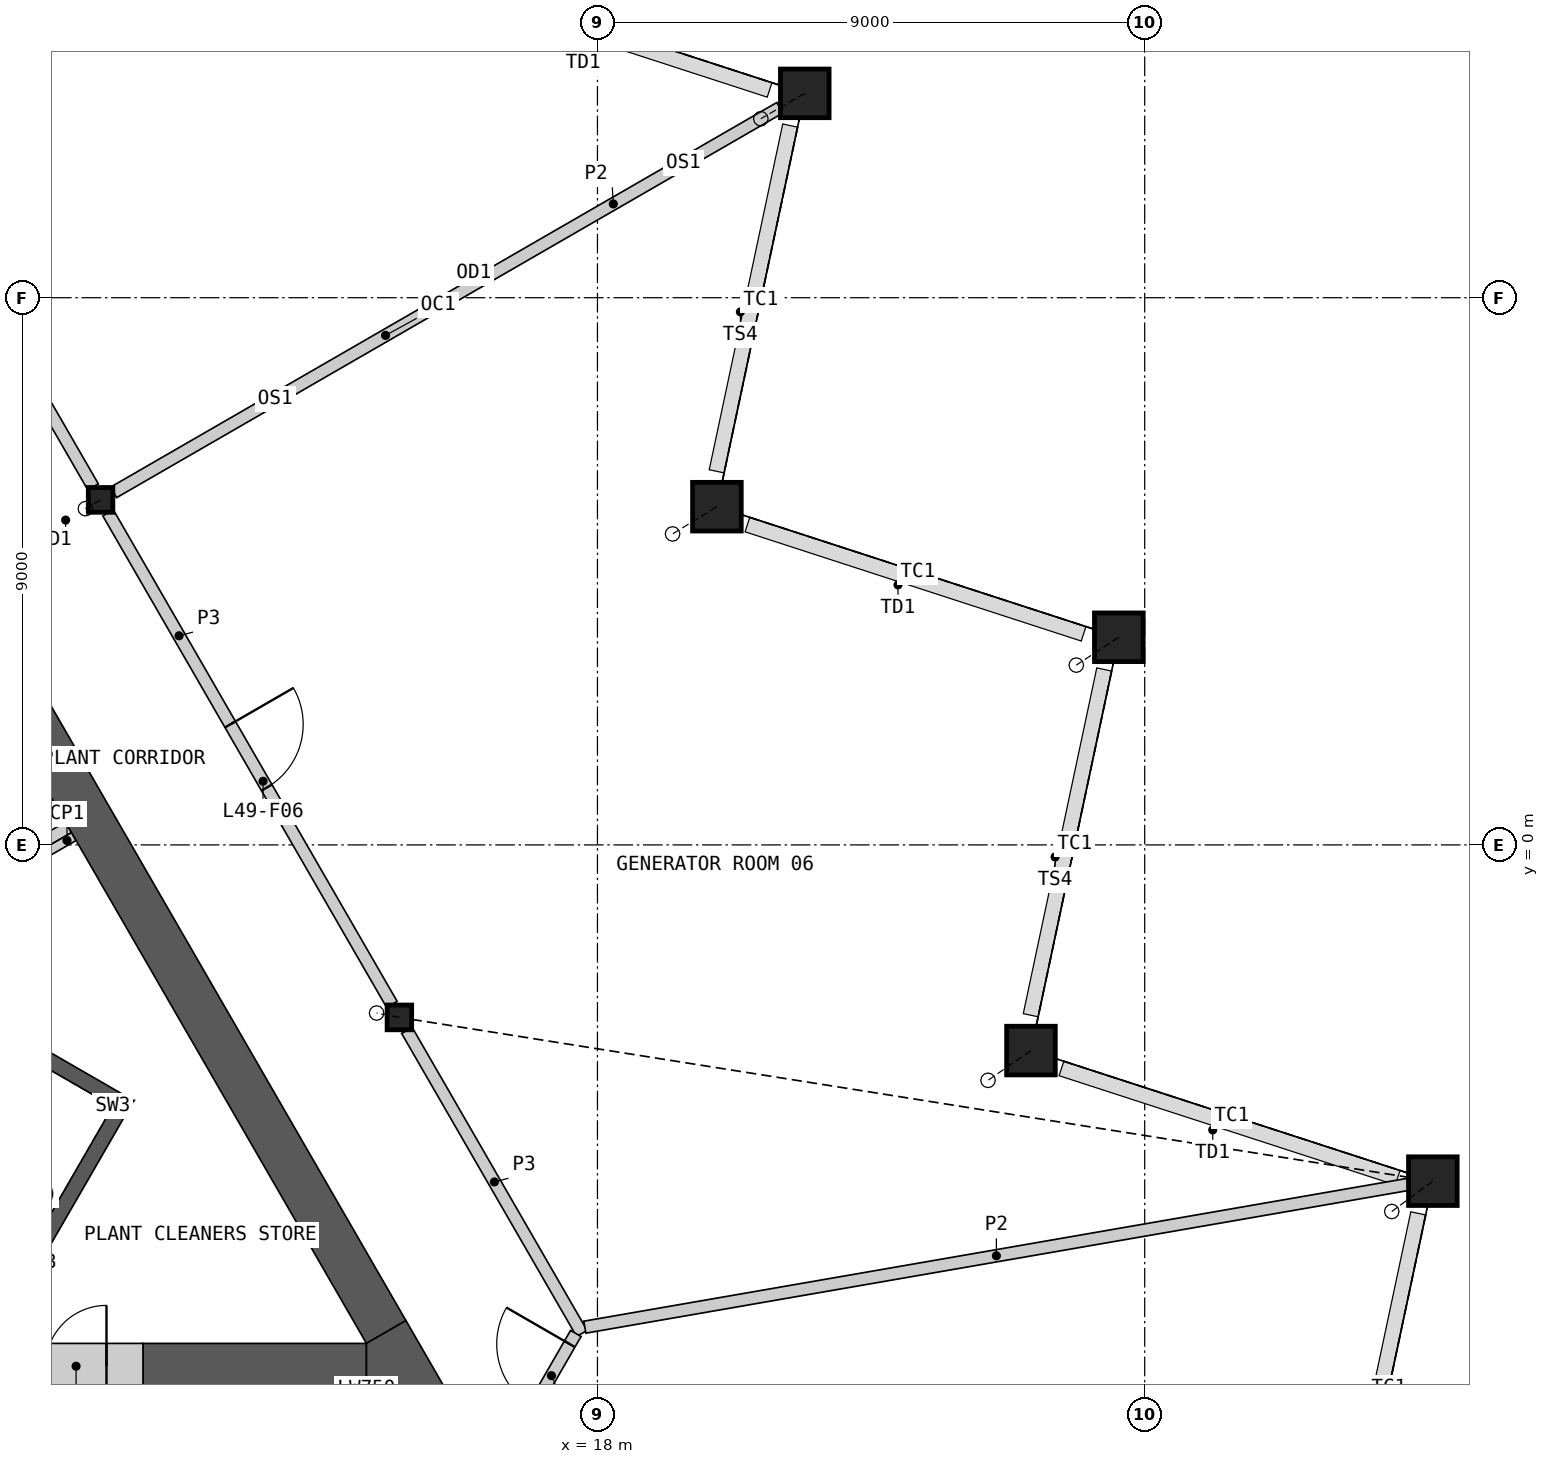
"""IFC4 building model, lengths in metres.
Left out: names, types, materials, properties, quantities, classifications, styles, units other than length and angle.
Written with IfcOpenShell. Run it as: python <this file> out.ifc"""

import sys

from ifc_helpers import new_model, si_unit, direction, frame, frame_2d, origin, origin_2d, place, context, subcontext, project, spatial, polyline, rectangle, hollow_rectangle, i_section, outline, extrude, element, fill, save


model = new_model("IFC4")
c1 = context("Model", 3, precision=1e-05, world=origin(), true_north=direction((0.0, 1.0)))
c2 = subcontext(c1, "Body", "Model", "MODEL_VIEW")
j1 = project(units=[si_unit("LENGTHUNIT", "METRE"), si_unit("PLANEANGLEUNIT", "RADIAN")], contexts=[c1])
p1 = place(None, origin())
s1 = spatial("IfcSite", under=j1, at=p1, CompositionType="ELEMENT")
p2 = place(p1, origin())
s2 = spatial("IfcBuilding", under=s1, at=p2, CompositionType="ELEMENT")
p3 = place(p2, frame((0.0, 0.0, 226.0)))
s3 = spatial("IfcBuildingStorey", under=s2, at=p3, CompositionType="ELEMENT", Elevation=226.0)
p4 = place(p3, frame((31.739, -5.53, 0.0), z_axis=(-0.133288732676, -0.098377485859, 0.986182530781), x_axis=(0.593843336629, -0.804580692995, 0.0)))
e1 = element("IfcColumn", 1, at=p4, inside=s3, PredefinedType="COLUMN", context=c2, shape_type="SweptSolid", body=[
    extrude(hollow_rectangle(XDim=0.8, YDim=0.8, WallThickness=0.05, at=origin_2d()), frame((0.0, 0.0, 0.067)), (0.0, 0.0, 1.0), 4.936),
])
p5 = place(p3, frame((25.129, -3.383, 0.0), z_axis=(-0.139172656038, -0.096391020071, 0.985565696979), x_axis=(0.569372564358, -0.822079608649, 0.0)))
e2 = element("IfcColumn", 2, at=p5, inside=s3, PredefinedType="COLUMN", context=c2, shape_type="SweptSolid", body=[
    extrude(hollow_rectangle(XDim=0.8, YDim=0.8, WallThickness=0.05, at=origin_2d()), frame((0.0, 0.0, 0.069)), (0.0, 0.0, 1.0), 4.936),
])
p6 = place(p3, frame((26.574, 3.415, 0.0), z_axis=(-0.137929662691, -0.090347781846, 0.986312671755), x_axis=(0.547941692307, -0.836516528128, 0.0)))
e3 = element("IfcColumn", 3, at=p6, inside=s3, PredefinedType="COLUMN", context=c2, shape_type="SweptSolid", body=[
    extrude(hollow_rectangle(XDim=0.8, YDim=0.8, WallThickness=0.05, at=origin_2d()), frame((0.0, 0.0, 0.067)), (0.0, 0.0, 1.0), 4.936),
])
p7 = place(p3, frame((19.965, 5.563, 0.0), z_axis=(-0.143805256431, -0.088362266, 0.985653163222), x_axis=(0.52352457136, -0.852010576919, 0.0)))
e4 = element("IfcColumn", 4, at=p7, inside=s3, PredefinedType="COLUMN", context=c2, shape_type="SweptSolid", body=[
    extrude(hollow_rectangle(XDim=0.8, YDim=0.8, WallThickness=0.05, at=origin_2d()), frame((0.0, 0.0, 0.069)), (0.0, 0.0, 1.0), 4.936),
])
p8 = place(p3, frame((21.409, 12.361, 0.0), z_axis=(-0.142558983537, -0.082356710084, 0.986354048259), x_axis=(0.500228859883, -0.865893231143, 0.0)))
e5 = element("IfcColumn", 5, at=p8, inside=s3, PredefinedType="COLUMN", context=c2, shape_type="SweptSolid", body=[
    extrude(hollow_rectangle(XDim=0.8, YDim=0.8, WallThickness=0.05, at=origin_2d()), frame((0.0, 0.0, 0.067)), (0.0, 0.0, 1.0), 4.936),
])
p9 = place(p3, frame((14.743, -2.837, 0.0), z_axis=(-0.074782233985, 0.014362473324, 0.997096453128), x_axis=(-0.188610251533, -0.982052021543, 0.0)))
e6 = element("IfcColumn", 6, at=p9, inside=s3, PredefinedType="COLUMN", context=c2, shape_type="SweptSolid", body=[
    extrude(i_section(OverallWidth=0.404, OverallDepth=0.407, WebThickness=0.027, FlangeThickness=0.044, at=origin_2d()), frame((0.0, 0.0, 0.016)), (0.0, 0.0, 1.0), 4.983),
])
p10 = place(p3, frame((9.828, 5.675, 0.0), z_axis=(-0.049916818753, -0.028858160841, 0.998336375055), x_axis=(0.500502949238, -0.865734831114, 0.0)))
e7 = element("IfcColumn", 7, at=p10, inside=s3, PredefinedType="COLUMN", context=c2, shape_type="SweptSolid", body=[
    extrude(i_section(OverallWidth=0.404, OverallDepth=0.407, WebThickness=0.027, FlangeThickness=0.044, at=origin_2d()), frame((0.0, 0.0, 0.012)), (0.0, 0.0, 1.0), 4.985),
])
p11 = place(p3, frame((8.181, -0.357, 0.0), z_axis=(0.0, 0.0, 1.0), x_axis=(0.866003189247, 0.500038474733, 0.0)))
e8 = element("IfcWall", 8, at=p11, inside=s3, PredefinedType="SHEAR", context=c2, shape_type="SweptSolid", body=[
    extrude(rectangle(XDim=1.293, YDim=0.2, at=frame_2d((0.646, 0.0))), origin(), (0.0, 0.0, 1.0), 4.65),
])
p12 = place(p3, origin())
e9 = element("IfcWall", 9, at=p12, inside=s3, PredefinedType="SHEAR", context=c2, shape_type="SweptSolid", body=[
    extrude(outline(polyline([(8.83, -6.881), (10.374, -4.206), (10.032, -4.298), (8.738, -6.539), (8.83, -6.881)])), origin(), (0.0, 0.0, 1.0), 4.65),
])
p13 = place(p3, origin())
e10 = element("IfcWall", 10, at=p13, inside=s3, PredefinedType="SHEAR", context=c2, shape_type="SweptSolid", body=[
    extrude(outline(polyline([(10.032, -4.298), (10.374, -4.206), (5.307, -1.281), (5.182, -1.498), (10.032, -4.298)])), origin(), (0.0, 0.0, 1.0), 4.65),
])
p14 = place(p3, frame((8.268, -0.509, 0.0), z_axis=(0.0, 0.0, 1.0), x_axis=(0.866003189247, 0.500038474733, 0.0)))
e11 = element("IfcWall", 11, at=p14, inside=s3, PredefinedType="PARTITIONING", context=c2, shape_type="SweptSolid", body=[
    extrude(rectangle(XDim=1.293, YDim=0.15, at=frame_2d((0.646, 0.0))), origin(), (0.0, 0.0, 1.0), 4.65),
])
p15 = place(p3, frame((10.525, -8.574, 0.0), z_axis=(0.0, 0.0, 1.0), x_axis=(1.0, 0.0, 0.0)))
e12 = element("IfcWall", 12, at=p15, inside=s3, PredefinedType="SHEAR", context=c2, shape_type="SweptSolid", body=[
    extrude(rectangle(XDim=3.676, YDim=0.75, at=frame_2d((1.838, 0.0))), origin(), (0.0, 0.0, 1.0), 4.65),
])
p16 = place(p3, frame((14.526, -8.011, 0.0), z_axis=(0.0, 0.0, 1.0), x_axis=(-0.499994855372, 0.866028374016, 0.0)))
e13 = element("IfcWall", 13, at=p16, inside=s3, PredefinedType="SHEAR", context=c2, shape_type="SweptSolid", body=[
    extrude(rectangle(XDim=14.301, YDim=0.75, at=frame_2d((7.15, 0.0))), origin(), (0.0, 0.0, 1.0), 4.65),
])
p17 = place(p3, origin())
e14 = element("IfcWall", 14, at=p17, inside=s3, PredefinedType="SHEAR", context=c2, shape_type="SweptSolid", body=[
    extrude(outline(polyline([(14.201, -8.949), (14.201, -8.199), (14.851, -7.824), (15.5, -8.949), (14.201, -8.949)])), origin(), (0.0, 0.0, 1.0), 4.65),
])
p18 = place(p3, frame((8.325, -8.574, 0.0), z_axis=(0.0, 0.0, 1.0), x_axis=(1.0, 0.0, 0.0)))
e15 = element("IfcWall", 15, at=p18, inside=s3, PredefinedType="SHEAR", context=c2, shape_type="SweptSolid", body=[
    extrude(rectangle(XDim=2.2, YDim=0.75, at=frame_2d((1.1, 0.0))), origin(), (0.0, 0.0, 1.0), 4.65),
])
p19 = place(p18, frame((0.6, 0.0, 0.0)))
e16 = element("IfcOpeningElement", 16, at=p19, cuts=e15, PredefinedType="OPENING", context=c2, shape_type="SweptSolid", body=[
    extrude(rectangle(XDim=1.0, YDim=2.1, at=frame_2d((0.5, 1.05))), frame((0.0, 0.385, 0.0), z_axis=(0.0, -1.0, 0.0), x_axis=(1.0, 0.0, 0.0)), (0.0, 0.0, 1.0), 0.77),
])
p20 = place(p3, frame((5.038, 13.972, 0.0), z_axis=(0.0, 0.0, 1.0), x_axis=(0.50000393355, -0.866023132736, 0.0)))
e17 = element("IfcWall", 17, at=p20, inside=s3, PredefinedType="PARTITIONING", context=c2, shape_type="SweptSolid", body=[
    extrude(rectangle(XDim=9.335, YDim=0.2, at=frame_2d((4.667, 0.0))), origin(), (0.0, 0.0, 1.0), 4.65),
])
p21 = place(p20, frame((4.118, 0.0, 0.0)))
e18 = element("IfcOpeningElement", 18, at=p21, cuts=e17, PredefinedType="OPENING", context=c2, shape_type="SweptSolid", body=[
    extrude(rectangle(XDim=1.2, YDim=2.1, at=frame_2d((0.6, 1.05))), frame((0.0, 0.11, 0.0), z_axis=(0.0, -1.0, 0.0), x_axis=(1.0, 0.0, 0.0)), (0.0, 0.0, 1.0), 0.22),
])
p22 = place(p3, frame((9.952, 5.461, 0.0), z_axis=(0.0, 0.0, 1.0), x_axis=(0.50000393355, -0.866023132736, 0.0)))
e19 = element("IfcWall", 19, at=p22, inside=s3, PredefinedType="PARTITIONING", context=c2, shape_type="SweptSolid", body=[
    extrude(rectangle(XDim=9.335, YDim=0.2, at=frame_2d((4.667, 0.0))), origin(), (0.0, 0.0, 1.0), 4.65),
])
p23 = place(p22, frame((4.017, 0.0, 0.0)))
e20 = element("IfcOpeningElement", 20, at=p23, cuts=e19, PredefinedType="OPENING", context=c2, shape_type="SweptSolid", body=[
    extrude(rectangle(XDim=1.2, YDim=2.1, at=frame_2d((0.6, 1.05))), frame((0.0, 0.11, 0.0), z_axis=(0.0, -1.0, 0.0), x_axis=(1.0, 0.0, 0.0)), (0.0, 0.0, 1.0), 0.22),
])
p24 = place(p3, frame((14.866, -3.051, 0.0), z_axis=(0.0, 0.0, 1.0), x_axis=(0.499975807604, -0.86603937082, 0.0)))
e21 = element("IfcWall", 21, at=p24, inside=s3, PredefinedType="PARTITIONING", context=c2, shape_type="SweptSolid", body=[
    extrude(rectangle(XDim=5.756, YDim=0.2, at=frame_2d((2.878, 0.0))), origin(), (0.0, 0.0, 1.0), 4.65),
])
p25 = place(p3, frame((15.781, -11.262, 0.0), z_axis=(0.0, 0.0, 1.0), x_axis=(0.499958791762, 0.866049194065, 0.0)))
e22 = element("IfcWall", 22, at=p25, inside=s3, PredefinedType="PARTITIONING", context=c2, shape_type="SweptSolid", body=[
    extrude(rectangle(XDim=3.726, YDim=0.2, at=frame_2d((1.863, 0.0))), origin(), (0.0, 0.0, 1.0), 4.65),
])
p26 = place(p25, frame((2.325, 0.0, 0.0)))
e23 = element("IfcOpeningElement", 23, at=p26, cuts=e22, PredefinedType="OPENING", context=c2, shape_type="SweptSolid", body=[
    extrude(rectangle(XDim=1.2, YDim=2.1, at=frame_2d((0.6, 1.05))), frame((0.0, 0.11, 0.0), z_axis=(0.0, -1.0, 0.0), x_axis=(1.0, 0.0, 0.0)), (0.0, 0.0, 1.0), 0.22),
])
p27 = place(p3, frame((17.792, -7.932, 0.0), z_axis=(0.0, 0.0, 1.0), x_axis=(0.985288995773, 0.170896444691, 0.0)))
e24 = element("IfcWall", 24, at=p27, inside=s3, PredefinedType="PARTITIONING", context=c2, shape_type="SweptSolid", body=[
    extrude(rectangle(XDim=13.739, YDim=0.2, at=frame_2d((6.869, 0.0))), origin(), (0.0, 0.0, 1.0), 4.65),
])
p28 = place(p3, frame((10.042, 5.798, 0.0), z_axis=(0.0, 0.0, 1.0), x_axis=(0.866025883649, 0.499999168849, 0.0)))
e25 = element("IfcWall", 25, at=p28, inside=s3, PredefinedType="PARTITIONING", context=c2, shape_type="SweptSolid", body=[
    extrude(rectangle(XDim=12.652, YDim=0.2, at=frame_2d((6.326, 0.0))), origin(), (0.0, 0.0, 1.0), 4.65),
])
p29 = place(p19, origin())
e26 = element("IfcDoor", 26, at=p29, inside=s3, OperationType="SINGLE_SWING_RIGHT", PredefinedType="DOOR", context=c2, shape_type="SweptSolid", body=[
    extrude(rectangle(XDim=1.0, YDim=2.1, at=frame_2d((0.5, 1.05))), frame((0.0, 0.13, 0.0), z_axis=(0.0, -1.0, 0.0), x_axis=(1.0, 0.0, 0.0)), (0.0, 0.0, 1.0), 0.05),
])
fill(e16, e26)
p30 = place(p26, origin())
e27 = element("IfcDoor", 27, at=p30, inside=s3, OperationType="SINGLE_SWING_RIGHT", PredefinedType="DOOR", context=c2, shape_type="SweptSolid", body=[
    extrude(rectangle(XDim=1.2, YDim=2.1, at=frame_2d((0.6, 1.05))), frame((0.0, 0.025, 0.0), z_axis=(0.0, -1.0, 0.0), x_axis=(1.0, 0.0, 0.0)), (0.0, 0.0, 1.0), 0.05),
])
fill(e23, e27)
p31 = place(p23, origin())
e28 = element("IfcDoor", 28, at=p31, inside=s3, OperationType="SINGLE_SWING_LEFT", PredefinedType="DOOR", context=c2, shape_type="SweptSolid", body=[
    extrude(rectangle(XDim=1.2, YDim=2.1, at=frame_2d((0.6, 1.05))), frame((0.0, 0.025, 0.0), z_axis=(0.0, -1.0, 0.0), x_axis=(1.0, 0.0, 0.0)), (0.0, 0.0, 1.0), 0.05),
])
fill(e20, e28)
save(model, sys.argv[1])
